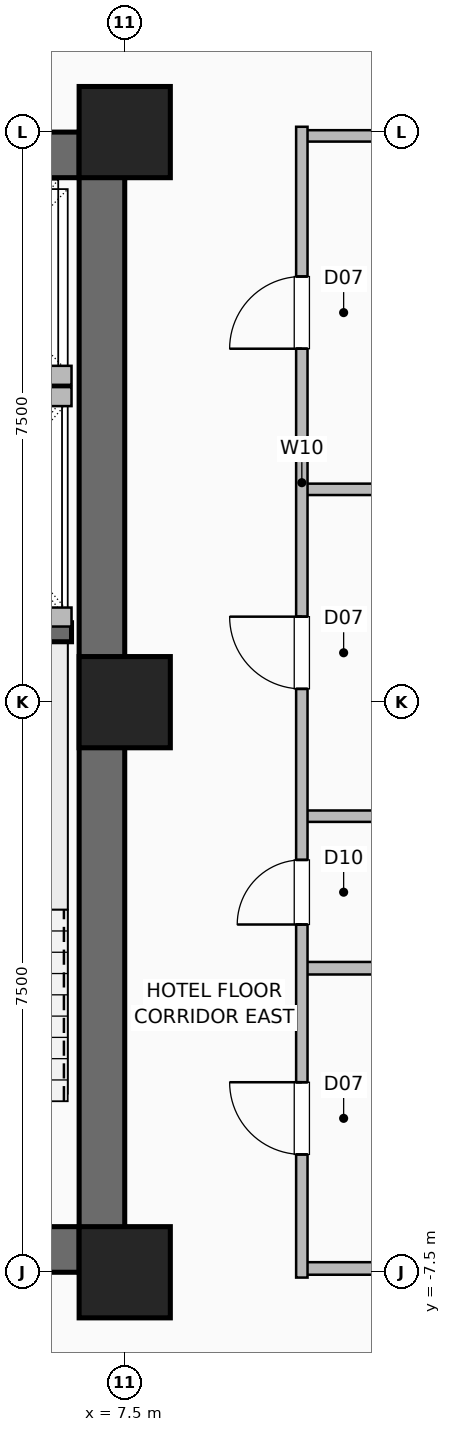
"""IFC4 building model, lengths in metres.
Left out: names, types, materials, properties, quantities, classifications, styles, units other than length and angle.
Written with IfcOpenShell. Run it as: python <this file> out.ifc"""

import sys

from ifc_helpers import new_model, si_unit, direction, frame, frame_2d, origin, origin_2d, place, context, subcontext, project, spatial, rectangle, hollow_rectangle, extrude, element, fill, save


model = new_model("IFC4")
c1 = context("Model", 3, precision=1e-05, world=origin(), true_north=direction((0.0, 1.0)))
c2 = subcontext(c1, "Body", "Model", "MODEL_VIEW")
j1 = project(units=[si_unit("LENGTHUNIT", "METRE"), si_unit("PLANEANGLEUNIT", "RADIAN")], contexts=[c1])
p1 = place(None, origin())
s1 = spatial("IfcSite", under=j1, at=p1, CompositionType="ELEMENT")
p2 = place(p1, origin())
s2 = spatial("IfcBuilding", under=s1, at=p2, CompositionType="ELEMENT")
p3 = place(p2, frame((0.0, 0.0, 27.0)))
s3 = spatial("IfcBuildingStorey", under=s2, at=p3, CompositionType="ELEMENT", Elevation=27.0)
for number, where, z_axis, x_axis in (
    (1, (7.5, -7.5, 0.0), (0.0, 0.0, 1.0), (1.0, 0.0, 0.0)),
    (2, (7.5, 0.0, 0.0), (0.0, 0.0, 1.0), (1.0, 0.0, 0.0)),
    (3, (7.5, 7.5, 0.0), (0.0, 0.0, 1.0), (1.0, 0.0, 0.0)),
):
    element("IfcColumn", number, at=place(p3, frame(where, z_axis=z_axis, x_axis=x_axis)), inside=s3, PredefinedType="COLUMN", context=c2, shape_type="SweptSolid", body=[
        extrude(hollow_rectangle(XDim=1.2, YDim=1.2, WallThickness=0.055, at=origin_2d()), origin(), (0.0, 0.0, 1.0), 3.5),
    ])
p4 = place(p3, frame((-7.5, -7.2, 0.0), z_axis=(0.0, 0.0, 1.0), x_axis=(1.0, 0.0, 0.0)))
e4 = element("IfcWall", 4, at=p4, inside=s3, PredefinedType="SHEAR", context=c2, shape_type="SweptSolid", body=[
    extrude(rectangle(XDim=15.0, YDim=0.6, at=frame_2d((7.5, 0.0))), origin(), (0.0, 0.0, 1.0), 3.25),
])
p5 = place(p4, frame((1.55, 0.0, 0.0)))
e5 = element("IfcOpeningElement", 5, at=p5, cuts=e4, PredefinedType="OPENING", context=c2, shape_type="SweptSolid", body=[
    extrude(rectangle(XDim=1.05, YDim=2.08, at=frame_2d((0.525, 1.04))), frame((0.0, 0.31, 0.0), z_axis=(0.0, -1.0, 0.0), x_axis=(1.0, 0.0, 0.0)), (0.0, 0.0, 1.0), 0.62),
])
p6 = place(p4, frame((12.4, 0.0, 0.0)))
e6 = element("IfcOpeningElement", 6, at=p6, cuts=e4, PredefinedType="OPENING", context=c2, shape_type="SweptSolid", body=[
    extrude(rectangle(XDim=1.05, YDim=2.08, at=frame_2d((0.525, 1.04))), frame((0.0, 0.31, 0.0), z_axis=(0.0, -1.0, 0.0), x_axis=(1.0, 0.0, 0.0)), (0.0, 0.0, 1.0), 0.62),
])
p7 = place(p4, frame((4.64, 0.0, 0.0)))
e7 = element("IfcOpeningElement", 7, at=p7, cuts=e4, PredefinedType="OPENING", context=c2, shape_type="SweptSolid", body=[
    extrude(rectangle(XDim=1.1, YDim=2.2, at=frame_2d((0.55, 1.1))), frame((0.0, 0.31, 0.0), z_axis=(0.0, -1.0, 0.0), x_axis=(1.0, 0.0, 0.0)), (0.0, 0.0, 1.0), 0.62),
])
p8 = place(p4, frame((6.52, 0.0, 0.0)))
e8 = element("IfcOpeningElement", 8, at=p8, cuts=e4, PredefinedType="OPENING", context=c2, shape_type="SweptSolid", body=[
    extrude(rectangle(XDim=1.1, YDim=2.2, at=frame_2d((0.55, 1.1))), frame((0.0, 0.31, 0.0), z_axis=(0.0, -1.0, 0.0), x_axis=(1.0, 0.0, 0.0)), (0.0, 0.0, 1.0), 0.62),
])
p9 = place(p4, frame((8.4, 0.0, 0.0)))
e9 = element("IfcOpeningElement", 9, at=p9, cuts=e4, PredefinedType="OPENING", context=c2, shape_type="SweptSolid", body=[
    extrude(rectangle(XDim=1.1, YDim=2.2, at=frame_2d((0.55, 1.1))), frame((0.0, 0.31, 0.0), z_axis=(0.0, -1.0, 0.0), x_axis=(1.0, 0.0, 0.0)), (0.0, 0.0, 1.0), 0.62),
])
for number, where, z_axis, x_axis in (
    (10, (-7.5, 7.2, 0.0), (0.0, 0.0, 1.0), (1.0, 0.0, 0.0)),
    (11, (7.2, -7.5, 0.0), (0.0, 0.0, 1.0), (0.0, 1.0, 0.0)),
):
    element("IfcWall", number, at=place(p3, frame(where, z_axis=z_axis, x_axis=x_axis)), inside=s3, PredefinedType="SHEAR", context=c2, shape_type="SweptSolid", body=[
        extrude(rectangle(XDim=15.0, YDim=0.6, at=frame_2d((7.5, 0.0))), origin(), (0.0, 0.0, 1.0), 3.25),
    ])
p10 = place(p3, frame((3.47, 0.92, 0.0), z_axis=(0.0, 0.0, 1.0), x_axis=(1.0, 0.0, 0.0)))
e12 = element("IfcWall", 12, at=p10, inside=s3, PredefinedType="SHEAR", context=c2, shape_type="SweptSolid", body=[
    extrude(rectangle(XDim=3.33, YDim=0.25, at=frame_2d((1.665, 0.0))), origin(), (0.0, 0.0, 1.0), 3.25),
])
p11 = place(p3, frame((4.38, 4.3, 0.0), z_axis=(0.0, 0.0, 1.0), x_axis=(1.0, 0.0, 0.0)))
e13 = element("IfcWall", 13, at=p11, inside=s3, PredefinedType="SHEAR", context=c2, shape_type="SweptSolid", body=[
    extrude(rectangle(XDim=2.42, YDim=0.25, at=frame_2d((1.21, 0.0))), origin(), (0.0, 0.0, 1.0), 3.25),
])
for number, where, z_axis, x_axis in (
    (14, (4.28, 1.12, 0.0), (0.0, 0.0, 1.0), (1.0, 0.0, 0.0)),
    (15, (4.28, 4.02, 0.0), (0.0, 0.0, 1.0), (1.0, 0.0, 0.0)),
):
    element("IfcWall", number, at=place(p3, frame(where, z_axis=z_axis, x_axis=x_axis)), inside=s3, PredefinedType="SHEAR", context=c2, shape_type="SweptSolid", body=[
        extrude(rectangle(XDim=2.52, YDim=0.25, at=frame_2d((1.26, 0.0))), origin(), (0.0, 0.0, 1.0), 3.25),
    ])
for number, where, z_axis, x_axis in (
    (16, (9.83, -7.45, 0.0), (0.0, 0.0, 1.0), (1.0, 0.0, 0.0)),
    (17, (9.83, -3.5, 0.0), (0.0, 0.0, 1.0), (1.0, 0.0, 0.0)),
):
    element("IfcWall", number, at=place(p3, frame(where, z_axis=z_axis, x_axis=x_axis)), inside=s3, PredefinedType="PLUMBINGWALL", context=c2, shape_type="SweptSolid", body=[
        extrude(rectangle(XDim=13.99, YDim=0.165, at=frame_2d((6.995, 0.0))), origin(), (0.0, 0.0, 1.0), 3.25),
    ])
for number, where, z_axis, x_axis in (
    (18, (9.83, -1.5, 0.0), (0.0, 0.0, 1.0), (1.0, 0.0, 0.0)),
    (19, (9.83, 2.8, 0.0), (0.0, 0.0, 1.0), (1.0, 0.0, 0.0)),
    (20, (9.83, 7.45, 0.0), (0.0, 0.0, 1.0), (1.0, 0.0, 0.0)),
):
    element("IfcWall", number, at=place(p3, frame(where, z_axis=z_axis, x_axis=x_axis)), inside=s3, PredefinedType="PARTITIONING", context=c2, shape_type="SweptSolid", body=[
        extrude(rectangle(XDim=13.99, YDim=0.15, at=frame_2d((6.995, 0.0))), origin(), (0.0, 0.0, 1.0), 3.25),
    ])
p12 = place(p3, frame((9.83, -7.57, 0.0), z_axis=(0.0, 0.0, 1.0), x_axis=(0.0, 1.0, 0.0)))
e21 = element("IfcWall", 21, at=p12, inside=s3, PredefinedType="PARTITIONING", context=c2, shape_type="SweptSolid", body=[
    extrude(rectangle(XDim=15.14, YDim=0.15, at=frame_2d((7.57, 0.0))), origin(), (0.0, 0.0, 1.0), 3.25),
])
p13 = place(p12, frame((1.62, 0.0, 0.0)))
e22 = element("IfcOpeningElement", 22, at=p13, cuts=e21, PredefinedType="OPENING", context=c2, shape_type="SweptSolid", body=[
    extrude(rectangle(XDim=0.95, YDim=2.06, at=frame_2d((0.475, 1.03))), frame((0.0, 0.085, 0.0), z_axis=(0.0, -1.0, 0.0), x_axis=(1.0, 0.0, 0.0)), (0.0, 0.0, 1.0), 0.17),
])
p14 = place(p12, frame((4.645, 0.0, 0.0)))
e23 = element("IfcOpeningElement", 23, at=p14, cuts=e21, PredefinedType="OPENING", context=c2, shape_type="SweptSolid", body=[
    extrude(rectangle(XDim=0.85, YDim=2.05, at=frame_2d((0.425, 1.025))), frame((0.0, 0.085, 0.0), z_axis=(0.0, -1.0, 0.0), x_axis=(1.0, 0.0, 0.0)), (0.0, 0.0, 1.0), 0.17),
])
p15 = place(p12, frame((7.745, 0.0, 0.0)))
e24 = element("IfcOpeningElement", 24, at=p15, cuts=e21, PredefinedType="OPENING", context=c2, shape_type="SweptSolid", body=[
    extrude(rectangle(XDim=0.95, YDim=2.06, at=frame_2d((0.475, 1.03))), frame((0.0, 0.085, 0.0), z_axis=(0.0, -1.0, 0.0), x_axis=(1.0, 0.0, 0.0)), (0.0, 0.0, 1.0), 0.17),
])
p16 = place(p12, frame((12.22, 0.0, 0.0)))
e25 = element("IfcOpeningElement", 25, at=p16, cuts=e21, PredefinedType="OPENING", context=c2, shape_type="SweptSolid", body=[
    extrude(rectangle(XDim=0.95, YDim=2.06, at=frame_2d((0.475, 1.03))), frame((0.0, 0.085, 0.0), z_axis=(0.0, -1.0, 0.0), x_axis=(1.0, 0.0, 0.0)), (0.0, 0.0, 1.0), 0.17),
])
p17 = place(p13, origin())
e26 = element("IfcDoor", 26, at=p17, inside=s3, OperationType="SINGLE_SWING_RIGHT", PredefinedType="DOOR", context=c2, shape_type="SweptSolid", body=[
    extrude(rectangle(XDim=0.95, YDim=2.06, at=frame_2d((0.475, 1.03))), frame((0.0, 0.025, 0.0), z_axis=(0.0, -1.0, 0.0), x_axis=(1.0, 0.0, 0.0)), (0.0, 0.0, 1.0), 0.05),
])
fill(e22, e26)
p18 = place(p14, origin())
e27 = element("IfcDoor", 27, at=p18, inside=s3, OperationType="SINGLE_SWING_LEFT", PredefinedType="DOOR", context=c2, shape_type="SweptSolid", body=[
    extrude(rectangle(XDim=0.85, YDim=2.05, at=frame_2d((0.425, 1.025))), frame((0.0, 0.025, 0.0), z_axis=(0.0, -1.0, 0.0), x_axis=(1.0, 0.0, 0.0)), (0.0, 0.0, 1.0), 0.05),
])
fill(e23, e27)
p19 = place(p15, origin())
e28 = element("IfcDoor", 28, at=p19, inside=s3, OperationType="SINGLE_SWING_RIGHT", PredefinedType="DOOR", context=c2, shape_type="SweptSolid", body=[
    extrude(rectangle(XDim=0.95, YDim=2.06, at=frame_2d((0.475, 1.03))), frame((0.0, 0.025, 0.0), z_axis=(0.0, -1.0, 0.0), x_axis=(1.0, 0.0, 0.0)), (0.0, 0.0, 1.0), 0.05),
])
fill(e24, e28)
p20 = place(p16, origin())
e29 = element("IfcDoor", 29, at=p20, inside=s3, OperationType="SINGLE_SWING_LEFT", PredefinedType="DOOR", context=c2, shape_type="SweptSolid", body=[
    extrude(rectangle(XDim=0.95, YDim=2.06, at=frame_2d((0.475, 1.03))), frame((0.0, 0.025, 0.0), z_axis=(0.0, -1.0, 0.0), x_axis=(1.0, 0.0, 0.0)), (0.0, 0.0, 1.0), 0.05),
])
fill(e25, e29)
save(model, sys.argv[1])
